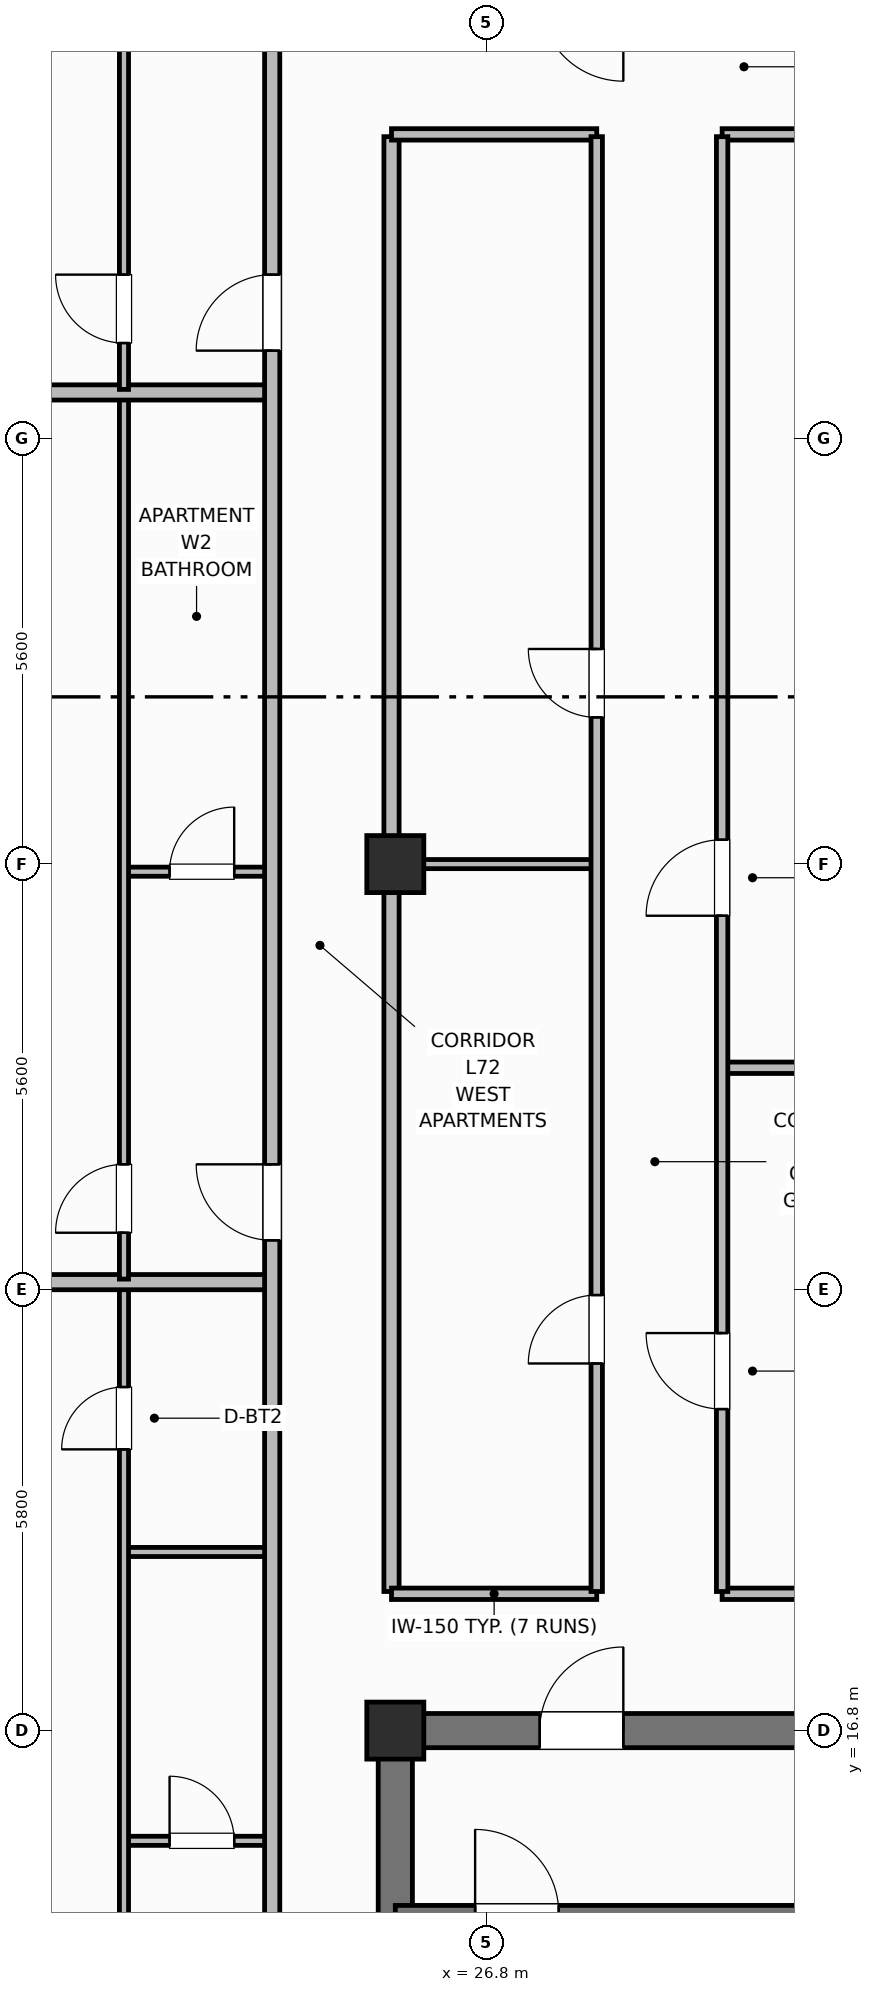
"""IFC4 building model, lengths in metres.
Left out: names, types, materials, properties, quantities, classifications, styles, units other than length and angle.
Written with IfcOpenShell. Run it as: python <this file> out.ifc"""

import sys

from ifc_helpers import new_model, si_unit, direction, frame, frame_2d, origin, origin_2d, place, context, subcontext, project, spatial, rectangle, extrude, element, fill, save


model = new_model("IFC4")
c1 = context("Model", 3, precision=1e-05, world=origin(), true_north=direction((0.0, 1.0)))
c2 = subcontext(c1, "Body", "Model", "MODEL_VIEW")
j1 = project(units=[si_unit("LENGTHUNIT", "METRE"), si_unit("PLANEANGLEUNIT", "RADIAN")], contexts=[c1])
p1 = place(None, origin())
s1 = spatial("IfcSite", under=j1, at=p1, CompositionType="ELEMENT")
p2 = place(p1, origin())
s2 = spatial("IfcBuilding", under=s1, at=p2, CompositionType="ELEMENT")
p3 = place(p2, frame((0.0, 0.0, 286.1)))
s3 = spatial("IfcBuildingStorey", under=s2, at=p3, CompositionType="ELEMENT", Elevation=286.1)
p4 = place(p3, frame((25.6, 10.825, 0.0), z_axis=(0.0, 0.0, 1.0), x_axis=(0.0, 1.0, 0.0)))
e1 = element("IfcWall", 1, at=p4, inside=s3, PredefinedType="SHEAR", context=c2, shape_type="SweptSolid", body=[
    extrude(rectangle(XDim=5.75, YDim=0.45, at=frame_2d((2.875, 0.0))), origin(), (0.0, 0.0, 1.0), 3.7),
])
p5 = place(p3, frame((25.6, 16.8, 0.0), z_axis=(0.0, 0.0, 1.0), x_axis=(1.0, 0.0, 0.0)))
e2 = element("IfcWall", 2, at=p5, inside=s3, PredefinedType="SHEAR", context=c2, shape_type="SweptSolid", body=[
    extrude(rectangle(XDim=27.2, YDim=0.45, at=frame_2d((13.6, 0.0))), origin(), (0.0, 0.0, 1.0), 3.7),
])
p6 = place(p5, frame((1.9, 0.0, 0.0)))
e3 = element("IfcOpeningElement", 3, at=p6, cuts=e2, PredefinedType="OPENING", context=c2, shape_type="SweptSolid", body=[
    extrude(rectangle(XDim=1.1, YDim=2.15, at=frame_2d((0.55, 1.075))), frame((0.0, 0.235, 0.0), z_axis=(0.0, -1.0, 0.0), x_axis=(1.0, 0.0, 0.0)), (0.0, 0.0, 1.0), 0.47),
])
p7 = place(p5, frame((13.0, 0.0, 0.0)))
e4 = element("IfcOpeningElement", 4, at=p7, cuts=e2, PredefinedType="OPENING", context=c2, shape_type="SweptSolid", body=[
    extrude(rectangle(XDim=1.2, YDim=2.15, at=frame_2d((0.6, 1.075))), frame((0.0, 0.235, 0.0), z_axis=(0.0, -1.0, 0.0), x_axis=(1.0, 0.0, 0.0)), (0.0, 0.0, 1.0), 0.47),
])
p8 = place(p5, frame((21.6, 0.0, 0.0)))
e5 = element("IfcOpeningElement", 5, at=p8, cuts=e2, PredefinedType="OPENING", context=c2, shape_type="SweptSolid", body=[
    extrude(rectangle(XDim=1.0, YDim=2.15, at=frame_2d((0.5, 1.075))), frame((0.0, 0.235, 0.0), z_axis=(0.0, -1.0, 0.0), x_axis=(1.0, 0.0, 0.0)), (0.0, 0.0, 1.0), 0.47),
])
for number, where, z_axis, x_axis in (
    (6, (25.6, 16.8, 0.0), (0.0, 0.0, 1.0), (1.0, 0.0, 0.0)),
    (7, (25.6, 28.2, 0.0), (0.0, 0.0, 1.0), (1.0, 0.0, 0.0)),
):
    element("IfcColumn", number, at=place(p3, frame(where, z_axis=z_axis, x_axis=x_axis)), inside=s3, PredefinedType="COLUMN", context=c2, shape_type="SweptSolid", body=[
        extrude(rectangle(XDim=0.75, YDim=0.75, at=origin_2d()), origin(), (0.0, 0.0, 1.0), 3.7),
    ])
p9 = place(p3, frame((25.6, 14.4, 0.0), z_axis=(0.0, 0.0, 1.0), x_axis=(1.0, 0.0, 0.0)))
e8 = element("IfcWall", 8, at=p9, inside=s3, PredefinedType="SHEAR", context=c2, shape_type="SweptSolid", body=[
    extrude(rectangle(XDim=9.55, YDim=0.2, at=frame_2d((4.775, 0.0))), origin(), (0.0, 0.0, 1.0), 3.7),
])
p10 = place(p9, frame((1.05, 0.0, 0.0)))
e9 = element("IfcOpeningElement", 9, at=p10, cuts=e8, PredefinedType="OPENING", context=c2, shape_type="SweptSolid", body=[
    extrude(rectangle(XDim=1.1, YDim=2.15, at=frame_2d((0.55, 1.075))), frame((0.0, 0.11, 0.0), z_axis=(0.0, -1.0, 0.0), x_axis=(1.0, 0.0, 0.0)), (0.0, 0.0, 1.0), 0.22),
])
p11 = place(p3, frame((25.55, 18.63, 0.0), z_axis=(0.0, 0.0, 1.0), x_axis=(0.0, 1.0, 0.0)))
e10 = element("IfcWall", 10, at=p11, inside=s3, PredefinedType="PARTITIONING", context=c2, shape_type="SweptSolid", body=[
    extrude(rectangle(XDim=19.14, YDim=0.2, at=frame_2d((9.57, 0.0))), origin(), (0.0, 0.0, 1.0), 2.56),
])
p12 = place(p3, frame((25.55, 18.6, 0.0), z_axis=(0.0, 0.0, 1.0), x_axis=(1.0, 0.0, 0.0)))
e11 = element("IfcWall", 11, at=p12, inside=s3, PredefinedType="PARTITIONING", context=c2, shape_type="SweptSolid", body=[
    extrude(rectangle(XDim=2.7, YDim=0.15, at=frame_2d((1.35, 0.0))), origin(), (0.0, 0.0, 1.0), 2.56),
])
p13 = place(p3, frame((29.9, 18.6, 0.0), z_axis=(0.0, 0.0, 1.0), x_axis=(1.0, 0.0, 0.0)))
e12 = element("IfcWall", 12, at=p13, inside=s3, PredefinedType="PARTITIONING", context=c2, shape_type="SweptSolid", body=[
    extrude(rectangle(XDim=22.95, YDim=0.15, at=frame_2d((11.475, 0.0))), origin(), (0.0, 0.0, 1.0), 2.56),
])
p14 = place(p3, frame((25.55, 37.8, 0.0), z_axis=(0.0, 0.0, 1.0), x_axis=(1.0, 0.0, 0.0)))
e13 = element("IfcWall", 13, at=p14, inside=s3, PredefinedType="PARTITIONING", context=c2, shape_type="SweptSolid", body=[
    extrude(rectangle(XDim=2.7, YDim=0.15, at=frame_2d((1.35, 0.0))), origin(), (0.0, 0.0, 1.0), 2.56),
])
p15 = place(p3, frame((29.9, 37.8, 0.0), z_axis=(0.0, 0.0, 1.0), x_axis=(1.0, 0.0, 0.0)))
e14 = element("IfcWall", 14, at=p15, inside=s3, PredefinedType="PARTITIONING", context=c2, shape_type="SweptSolid", body=[
    extrude(rectangle(XDim=22.95, YDim=0.15, at=frame_2d((11.475, 0.0))), origin(), (0.0, 0.0, 1.0), 2.56),
])
p16 = place(p3, frame((25.6, 28.2, 0.0), z_axis=(0.0, 0.0, 1.0), x_axis=(1.0, 0.0, 0.0)))
e15 = element("IfcWall", 15, at=p16, inside=s3, PredefinedType="PARTITIONING", context=c2, shape_type="SweptSolid", body=[
    extrude(rectangle(XDim=2.66, YDim=0.12, at=frame_2d((1.33, 0.0))), origin(), (0.0, 0.0, 1.0), 2.56),
])
p17 = place(p3, frame((29.93, 25.521, 0.0), z_axis=(0.0, 0.0, 1.0), x_axis=(1.0, 0.0, 0.0)))
e16 = element("IfcWall", 16, at=p17, inside=s3, PredefinedType="PARTITIONING", context=c2, shape_type="SweptSolid", body=[
    extrude(rectangle(XDim=22.87, YDim=0.15, at=frame_2d((11.435, 0.0))), origin(), (0.0, 0.0, 1.0), 2.56),
])
p18 = place(p3, frame((28.25, 18.63, 0.0), z_axis=(0.0, 0.0, 1.0), x_axis=(0.0, 1.0, 0.0)))
e17 = element("IfcWall", 17, at=p18, inside=s3, PredefinedType="PARTITIONING", context=c2, shape_type="SweptSolid", body=[
    extrude(rectangle(XDim=19.14, YDim=0.15, at=frame_2d((9.57, 0.0))), origin(), (0.0, 0.0, 1.0), 2.56),
])
p19 = place(p18, frame((3.0, 0.0, 0.0)))
e18 = element("IfcOpeningElement", 18, at=p19, cuts=e17, PredefinedType="OPENING", context=c2, shape_type="SweptSolid", body=[
    extrude(rectangle(XDim=0.9, YDim=2.1, at=frame_2d((0.45, 1.05))), frame((0.0, 0.085, 0.0), z_axis=(0.0, -1.0, 0.0), x_axis=(1.0, 0.0, 0.0)), (0.0, 0.0, 1.0), 0.17),
])
p20 = place(p18, frame((11.5, 0.0, 0.0)))
e19 = element("IfcOpeningElement", 19, at=p20, cuts=e17, PredefinedType="OPENING", context=c2, shape_type="SweptSolid", body=[
    extrude(rectangle(XDim=0.9, YDim=2.1, at=frame_2d((0.45, 1.05))), frame((0.0, 0.085, 0.0), z_axis=(0.0, -1.0, 0.0), x_axis=(1.0, 0.0, 0.0)), (0.0, 0.0, 1.0), 0.17),
])
p21 = place(p3, frame((29.9, 18.63, 0.0), z_axis=(0.0, 0.0, 1.0), x_axis=(0.0, 1.0, 0.0)))
e20 = element("IfcWall", 20, at=p21, inside=s3, PredefinedType="PARTITIONING", context=c2, shape_type="SweptSolid", body=[
    extrude(rectangle(XDim=19.14, YDim=0.15, at=frame_2d((9.57, 0.0))), origin(), (0.0, 0.0, 1.0), 2.56),
])
p22 = place(p21, frame((2.4, 0.0, 0.0)))
e21 = element("IfcOpeningElement", 21, at=p22, cuts=e20, PredefinedType="OPENING", context=c2, shape_type="SweptSolid", body=[
    extrude(rectangle(XDim=1.0, YDim=2.15, at=frame_2d((0.5, 1.075))), frame((0.0, 0.085, 0.0), z_axis=(0.0, -1.0, 0.0), x_axis=(1.0, 0.0, 0.0)), (0.0, 0.0, 1.0), 0.17),
])
p23 = place(p21, frame((8.89, 0.0, 0.0)))
e22 = element("IfcOpeningElement", 22, at=p23, cuts=e20, PredefinedType="OPENING", context=c2, shape_type="SweptSolid", body=[
    extrude(rectangle(XDim=1.0, YDim=2.15, at=frame_2d((0.5, 1.075))), frame((0.0, 0.085, 0.0), z_axis=(0.0, -1.0, 0.0), x_axis=(1.0, 0.0, 0.0)), (0.0, 0.0, 1.0), 0.17),
])
p24 = place(p3, frame((22.03, 15.35, 0.0), z_axis=(0.0, 0.0, 1.0), x_axis=(1.0, 0.0, 0.0)))
e23 = element("IfcWall", 23, at=p24, inside=s3, PredefinedType="PARTITIONING", context=c2, shape_type="SweptSolid", body=[
    extrude(rectangle(XDim=1.95, YDim=0.12, at=frame_2d((0.975, 0.0))), origin(), (0.0, 0.0, 1.0), 2.56),
])
p25 = place(p24, frame((0.6, 0.0, 0.0)))
e24 = element("IfcOpeningElement", 24, at=p25, cuts=e23, PredefinedType="OPENING", context=c2, shape_type="SweptSolid", body=[
    extrude(rectangle(XDim=0.85, YDim=2.1, at=frame_2d((0.425, 1.05))), frame((0.0, 0.07, 0.0), z_axis=(0.0, -1.0, 0.0), x_axis=(1.0, 0.0, 0.0)), (0.0, 0.0, 1.0), 0.14),
])
p26 = place(p3, frame((22.03, 19.15, 0.0), z_axis=(0.0, 0.0, 1.0), x_axis=(1.0, 0.0, 0.0)))
e25 = element("IfcWall", 25, at=p26, inside=s3, PredefinedType="PARTITIONING", context=c2, shape_type="SweptSolid", body=[
    extrude(rectangle(XDim=1.95, YDim=0.12, at=frame_2d((0.975, 0.0))), origin(), (0.0, 0.0, 1.0), 2.56),
])
p27 = place(p3, frame((22.03, 9.99, 0.0), z_axis=(0.0, 0.0, 1.0), x_axis=(0.0, 1.0, 0.0)))
e26 = element("IfcWall", 26, at=p27, inside=s3, PredefinedType="PARTITIONING", context=c2, shape_type="SweptSolid", body=[
    extrude(rectangle(XDim=12.67, YDim=0.12, at=frame_2d((6.335, 0.0))), origin(), (0.0, 0.0, 1.0), 2.56),
])
p28 = place(p27, frame((0.41, 0.0, 0.0)))
e27 = element("IfcOpeningElement", 27, at=p28, cuts=e26, PredefinedType="OPENING", context=c2, shape_type="SweptSolid", body=[
    extrude(rectangle(XDim=0.9, YDim=2.1, at=frame_2d((0.45, 1.05))), frame((0.0, 0.07, 0.0), z_axis=(0.0, -1.0, 0.0), x_axis=(1.0, 0.0, 0.0)), (0.0, 0.0, 1.0), 0.14),
])
p29 = place(p27, frame((10.51, 0.0, 0.0)))
e28 = element("IfcOpeningElement", 28, at=p29, cuts=e26, PredefinedType="OPENING", context=c2, shape_type="SweptSolid", body=[
    extrude(rectangle(XDim=0.82, YDim=2.08, at=frame_2d((0.41, 1.04))), frame((0.0, 0.07, 0.0), z_axis=(0.0, -1.0, 0.0), x_axis=(1.0, 0.0, 0.0)), (0.0, 0.0, 1.0), 0.14),
])
p30 = place(p3, frame((19.53, 22.7, 0.0), z_axis=(0.0, 0.0, 1.0), x_axis=(1.0, 0.0, 0.0)))
e29 = element("IfcWall", 29, at=p30, inside=s3, PredefinedType="PARTITIONING", context=c2, shape_type="SweptSolid", body=[
    extrude(rectangle(XDim=4.45, YDim=0.2, at=frame_2d((2.225, 0.0))), origin(), (0.0, 0.0, 1.0), 2.56),
])
p31 = place(p3, frame((22.03, 28.1, 0.0), z_axis=(0.0, 0.0, 1.0), x_axis=(1.0, 0.0, 0.0)))
e30 = element("IfcWall", 30, at=p31, inside=s3, PredefinedType="PARTITIONING", context=c2, shape_type="SweptSolid", body=[
    extrude(rectangle(XDim=1.95, YDim=0.12, at=frame_2d((0.975, 0.0))), origin(), (0.0, 0.0, 1.0), 2.56),
])
p32 = place(p31, frame((0.6, 0.0, 0.0)))
e31 = element("IfcOpeningElement", 31, at=p32, cuts=e30, PredefinedType="OPENING", context=c2, shape_type="SweptSolid", body=[
    extrude(rectangle(XDim=0.85, YDim=2.1, at=frame_2d((0.425, 1.05))), frame((0.0, 0.07, 0.0), z_axis=(0.0, -1.0, 0.0), x_axis=(1.0, 0.0, 0.0)), (0.0, 0.0, 1.0), 0.14),
])
p33 = place(p3, frame((22.03, 22.74, 0.0), z_axis=(0.0, 0.0, 1.0), x_axis=(0.0, 1.0, 0.0)))
e32 = element("IfcWall", 32, at=p33, inside=s3, PredefinedType="PARTITIONING", context=c2, shape_type="SweptSolid", body=[
    extrude(rectangle(XDim=11.625, YDim=0.12, at=frame_2d((5.812, 0.0))), origin(), (0.0, 0.0, 1.0), 2.56),
])
p34 = place(p33, frame((0.61, 0.0, 0.0)))
e33 = element("IfcOpeningElement", 33, at=p34, cuts=e32, PredefinedType="OPENING", context=c2, shape_type="SweptSolid", body=[
    extrude(rectangle(XDim=0.9, YDim=2.1, at=frame_2d((0.45, 1.05))), frame((0.0, 0.07, 0.0), z_axis=(0.0, -1.0, 0.0), x_axis=(1.0, 0.0, 0.0)), (0.0, 0.0, 1.0), 0.14),
])
p35 = place(p3, frame((19.53, 34.405, 0.0), z_axis=(0.0, 0.0, 1.0), x_axis=(1.0, 0.0, 0.0)))
e34 = element("IfcWall", 34, at=p35, inside=s3, PredefinedType="PARTITIONING", context=c2, shape_type="SweptSolid", body=[
    extrude(rectangle(XDim=4.45, YDim=0.2, at=frame_2d((2.225, 0.0))), origin(), (0.0, 0.0, 1.0), 2.56),
])
p36 = place(p3, frame((22.03, 34.445, 0.0), z_axis=(0.0, 0.0, 1.0), x_axis=(0.0, 1.0, 0.0)))
e35 = element("IfcWall", 35, at=p36, inside=s3, PredefinedType="PARTITIONING", context=c2, shape_type="SweptSolid", body=[
    extrude(rectangle(XDim=11.965, YDim=0.12, at=frame_2d((5.982, 0.0))), origin(), (0.0, 0.0, 1.0), 2.56),
])
p37 = place(p36, frame((0.61, 0.0, 0.0)))
e36 = element("IfcOpeningElement", 36, at=p37, cuts=e35, PredefinedType="OPENING", context=c2, shape_type="SweptSolid", body=[
    extrude(rectangle(XDim=0.9, YDim=2.1, at=frame_2d((0.45, 1.05))), frame((0.0, 0.07, 0.0), z_axis=(0.0, -1.0, 0.0), x_axis=(1.0, 0.0, 0.0)), (0.0, 0.0, 1.0), 0.14),
])
p38 = place(p36, frame((10.157, 0.0, 0.0)))
e37 = element("IfcOpeningElement", 37, at=p38, cuts=e35, PredefinedType="OPENING", context=c2, shape_type="SweptSolid", body=[
    extrude(rectangle(XDim=0.82, YDim=2.08, at=frame_2d((0.41, 1.04))), frame((0.0, 0.07, 0.0), z_axis=(0.0, -1.0, 0.0), x_axis=(1.0, 0.0, 0.0)), (0.0, 0.0, 1.0), 0.14),
])
p39 = place(p3, frame((23.98, 9.95, 0.0), z_axis=(0.0, 0.0, 1.0), x_axis=(0.0, 1.0, 0.0)))
e38 = element("IfcWall", 38, at=p39, inside=s3, PredefinedType="PARTITIONING", context=c2, shape_type="SweptSolid", body=[
    extrude(rectangle(XDim=36.5, YDim=0.2, at=frame_2d((18.25, 0.0))), origin(), (0.0, 0.0, 1.0), 2.56),
])
p40 = place(p39, frame((3.25, 0.0, 0.0)))
e39 = element("IfcOpeningElement", 39, at=p40, cuts=e38, PredefinedType="OPENING", context=c2, shape_type="SweptSolid", body=[
    extrude(rectangle(XDim=1.0, YDim=2.15, at=frame_2d((0.5, 1.075))), frame((0.0, 0.11, 0.0), z_axis=(0.0, -1.0, 0.0), x_axis=(1.0, 0.0, 0.0)), (0.0, 0.0, 1.0), 0.22),
])
p41 = place(p39, frame((13.3, 0.0, 0.0)))
e40 = element("IfcOpeningElement", 40, at=p41, cuts=e38, PredefinedType="OPENING", context=c2, shape_type="SweptSolid", body=[
    extrude(rectangle(XDim=1.0, YDim=2.15, at=frame_2d((0.5, 1.075))), frame((0.0, 0.11, 0.0), z_axis=(0.0, -1.0, 0.0), x_axis=(1.0, 0.0, 0.0)), (0.0, 0.0, 1.0), 0.22),
])
p42 = place(p39, frame((25.005, 0.0, 0.0)))
e41 = element("IfcOpeningElement", 41, at=p42, cuts=e38, PredefinedType="OPENING", context=c2, shape_type="SweptSolid", body=[
    extrude(rectangle(XDim=1.0, YDim=2.15, at=frame_2d((0.5, 1.075))), frame((0.0, 0.11, 0.0), z_axis=(0.0, -1.0, 0.0), x_axis=(1.0, 0.0, 0.0)), (0.0, 0.0, 1.0), 0.22),
])
p43 = place(p10, origin())
e42 = element("IfcDoor", 42, at=p43, inside=s3, OperationType="SINGLE_SWING_LEFT", PredefinedType="DOOR", context=c2, shape_type="SweptSolid", body=[
    extrude(rectangle(XDim=1.1, YDim=2.15, at=frame_2d((0.55, 1.075))), frame((0.0, 0.025, 0.0), z_axis=(0.0, -1.0, 0.0), x_axis=(1.0, 0.0, 0.0)), (0.0, 0.0, 1.0), 0.05),
])
fill(e9, e42)
p44 = place(p19, origin())
e43 = element("IfcDoor", 43, at=p44, inside=s3, OperationType="SINGLE_SWING_LEFT", PredefinedType="DOOR", context=c2, shape_type="SweptSolid", body=[
    extrude(rectangle(XDim=0.9, YDim=2.1, at=frame_2d((0.45, 1.05))), frame((0.0, 0.025, 0.0), z_axis=(0.0, -1.0, 0.0), x_axis=(1.0, 0.0, 0.0)), (0.0, 0.0, 1.0), 0.05),
])
fill(e18, e43)
p45 = place(p20, origin())
e44 = element("IfcDoor", 44, at=p45, inside=s3, OperationType="SINGLE_SWING_RIGHT", PredefinedType="DOOR", context=c2, shape_type="SweptSolid", body=[
    extrude(rectangle(XDim=0.9, YDim=2.1, at=frame_2d((0.45, 1.05))), frame((0.0, 0.025, 0.0), z_axis=(0.0, -1.0, 0.0), x_axis=(1.0, 0.0, 0.0)), (0.0, 0.0, 1.0), 0.05),
])
fill(e19, e44)
p46 = place(p22, origin())
e45 = element("IfcDoor", 45, at=p46, inside=s3, OperationType="SINGLE_SWING_RIGHT", PredefinedType="DOOR", context=c2, shape_type="SweptSolid", body=[
    extrude(rectangle(XDim=1.0, YDim=2.15, at=frame_2d((0.5, 1.075))), frame((0.0, 0.025, 0.0), z_axis=(0.0, -1.0, 0.0), x_axis=(1.0, 0.0, 0.0)), (0.0, 0.0, 1.0), 0.05),
])
fill(e21, e45)
p47 = place(p23, origin())
e46 = element("IfcDoor", 46, at=p47, inside=s3, OperationType="SINGLE_SWING_LEFT", PredefinedType="DOOR", context=c2, shape_type="SweptSolid", body=[
    extrude(rectangle(XDim=1.0, YDim=2.15, at=frame_2d((0.5, 1.075))), frame((0.0, 0.025, 0.0), z_axis=(0.0, -1.0, 0.0), x_axis=(1.0, 0.0, 0.0)), (0.0, 0.0, 1.0), 0.05),
])
fill(e22, e46)
p48 = place(p25, origin())
e47 = element("IfcDoor", 47, at=p48, inside=s3, OperationType="SINGLE_SWING_LEFT", PredefinedType="DOOR", context=c2, shape_type="SweptSolid", body=[
    extrude(rectangle(XDim=0.85, YDim=2.1, at=frame_2d((0.425, 1.05))), frame((0.0, 0.025, 0.0), z_axis=(0.0, -1.0, 0.0), x_axis=(1.0, 0.0, 0.0)), (0.0, 0.0, 1.0), 0.05),
])
fill(e24, e47)
p49 = place(p29, origin())
e48 = element("IfcDoor", 48, at=p49, inside=s3, OperationType="SINGLE_SWING_LEFT", PredefinedType="DOOR", context=c2, shape_type="SweptSolid", body=[
    extrude(rectangle(XDim=0.82, YDim=2.08, at=frame_2d((0.41, 1.04))), frame((0.0, 0.025, 0.0), z_axis=(0.0, -1.0, 0.0), x_axis=(1.0, 0.0, 0.0)), (0.0, 0.0, 1.0), 0.05),
])
fill(e28, e48)
p50 = place(p32, origin())
e49 = element("IfcDoor", 49, at=p50, inside=s3, OperationType="SINGLE_SWING_RIGHT", PredefinedType="DOOR", context=c2, shape_type="SweptSolid", body=[
    extrude(rectangle(XDim=0.85, YDim=2.1, at=frame_2d((0.425, 1.05))), frame((0.0, 0.025, 0.0), z_axis=(0.0, -1.0, 0.0), x_axis=(1.0, 0.0, 0.0)), (0.0, 0.0, 1.0), 0.05),
])
fill(e31, e49)
p51 = place(p34, origin())
e50 = element("IfcDoor", 50, at=p51, inside=s3, OperationType="SINGLE_SWING_LEFT", PredefinedType="DOOR", context=c2, shape_type="SweptSolid", body=[
    extrude(rectangle(XDim=0.9, YDim=2.1, at=frame_2d((0.45, 1.05))), frame((0.0, 0.025, 0.0), z_axis=(0.0, -1.0, 0.0), x_axis=(1.0, 0.0, 0.0)), (0.0, 0.0, 1.0), 0.05),
])
fill(e33, e50)
p52 = place(p37, origin())
e51 = element("IfcDoor", 51, at=p52, inside=s3, OperationType="SINGLE_SWING_RIGHT", PredefinedType="DOOR", context=c2, shape_type="SweptSolid", body=[
    extrude(rectangle(XDim=0.9, YDim=2.1, at=frame_2d((0.45, 1.05))), frame((0.0, 0.025, 0.0), z_axis=(0.0, -1.0, 0.0), x_axis=(1.0, 0.0, 0.0)), (0.0, 0.0, 1.0), 0.05),
])
fill(e36, e51)
p53 = place(p41, origin())
e52 = element("IfcDoor", 52, at=p53, inside=s3, OperationType="SINGLE_SWING_RIGHT", PredefinedType="DOOR", context=c2, shape_type="SweptSolid", body=[
    extrude(rectangle(XDim=1.0, YDim=2.15, at=frame_2d((0.5, 1.075))), frame((0.0, 0.025, 0.0), z_axis=(0.0, -1.0, 0.0), x_axis=(1.0, 0.0, 0.0)), (0.0, 0.0, 1.0), 0.05),
])
fill(e40, e52)
p54 = place(p42, origin())
e53 = element("IfcDoor", 53, at=p54, inside=s3, OperationType="SINGLE_SWING_LEFT", PredefinedType="DOOR", context=c2, shape_type="SweptSolid", body=[
    extrude(rectangle(XDim=1.0, YDim=2.15, at=frame_2d((0.5, 1.075))), frame((0.0, 0.025, 0.0), z_axis=(0.0, -1.0, 0.0), x_axis=(1.0, 0.0, 0.0)), (0.0, 0.0, 1.0), 0.05),
])
fill(e41, e53)
p55 = place(p6, origin())
e54 = element("IfcDoor", 54, at=p55, inside=s3, OperationType="SINGLE_SWING_RIGHT", PredefinedType="DOOR", context=c2, shape_type="SweptSolid", body=[
    extrude(rectangle(XDim=1.1, YDim=2.15, at=frame_2d((0.55, 1.075))), frame((0.0, 0.025, 0.0), z_axis=(0.0, -1.0, 0.0), x_axis=(1.0, 0.0, 0.0)), (0.0, 0.0, 1.0), 0.05),
])
fill(e3, e54)
save(model, sys.argv[1])
